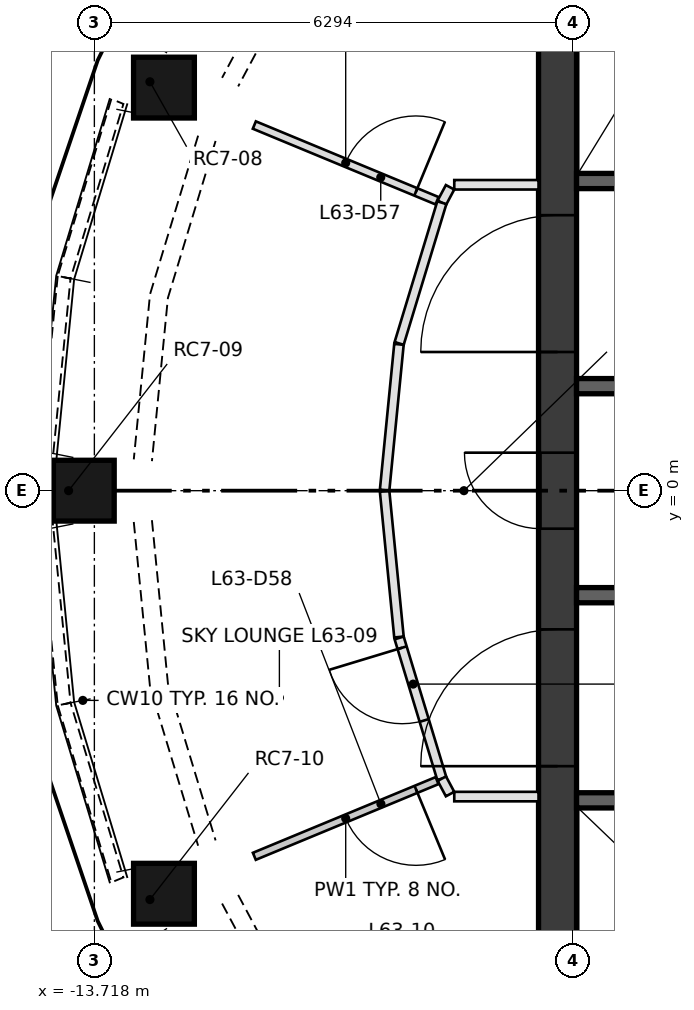
"""IFC4 building model, lengths in metres.
Left out: names, types, materials, properties, quantities, classifications, styles, units other than length and angle.
Written with IfcOpenShell. Run it as: python <this file> out.ifc"""

import sys

from ifc_helpers import new_model, si_unit, direction, frame, frame_2d, origin, origin_2d, place, context, subcontext, project, spatial, polyline, rectangle, outline, extrude, element, fill, save


model = new_model("IFC4")
c1 = context("Model", 3, precision=1e-05, world=origin(), true_north=direction((0.0, 1.0)))
c2 = subcontext(c1, "Body", "Model", "MODEL_VIEW")
j1 = project(units=[si_unit("LENGTHUNIT", "METRE"), si_unit("PLANEANGLEUNIT", "RADIAN")], contexts=[c1])
p1 = place(None, origin())
s1 = spatial("IfcSite", under=j1, at=p1, CompositionType="ELEMENT")
p2 = place(p1, origin())
s2 = spatial("IfcBuilding", under=s1, at=p2, CompositionType="ELEMENT")
p3 = place(p2, frame((0.0, 0.0, 231.2)))
s3 = spatial("IfcBuildingStorey", under=s2, at=p3, CompositionType="ELEMENT", Elevation=231.2)
p4 = place(p3, frame((-12.987, 5.379, 0.5), z_axis=(0.0, 0.0, 1.0), x_axis=(0.382642651649, 0.923896423382, 0.0)))
e1 = element("IfcColumn", 1, at=p4, inside=s3, PredefinedType="COLUMN", context=c2, shape_type="SweptSolid", body=[
    extrude(rectangle(XDim=0.8, YDim=0.8, at=origin_2d()), origin(), (0.0, -0.275, 0.962), 3.328),
])
p5 = place(p3, frame((-14.057, 0.0, 0.5), z_axis=(0.0, 0.0, 1.0), x_axis=(0.0, 1.0, 0.0)))
e2 = element("IfcColumn", 2, at=p5, inside=s3, PredefinedType="COLUMN", context=c2, shape_type="SweptSolid", body=[
    extrude(rectangle(XDim=0.8, YDim=0.8, at=origin_2d()), origin(), (0.0, -0.275, 0.962), 3.328),
])
p6 = place(p3, frame((-12.987, -5.379, 0.5), z_axis=(0.0, 0.0, 1.0), x_axis=(-0.382642651649, 0.923896423382, 0.0)))
e3 = element("IfcColumn", 3, at=p6, inside=s3, PredefinedType="COLUMN", context=c2, shape_type="SweptSolid", body=[
    extrude(rectangle(XDim=0.8, YDim=0.8, at=origin_2d()), origin(), (0.0, -0.275, 0.962), 3.328),
])
p7 = place(p3, frame((-7.624, -7.374, 0.0), z_axis=(0.0, 0.0, 1.0), x_axis=(0.0, 1.0, 0.0)))
e4 = element("IfcWall", 4, at=p7, inside=s3, PredefinedType="SHEAR", context=c2, shape_type="SweptSolid", body=[
    extrude(rectangle(XDim=14.748, YDim=0.5, at=frame_2d((7.374, 0.0))), origin(), (0.0, 0.0, 1.0), 3.3),
])
p8 = place(p7, frame((6.874, 0.0, 0.0)))
e5 = element("IfcOpeningElement", 5, at=p8, cuts=e4, PredefinedType="OPENING", context=c2, shape_type="SweptSolid", body=[
    extrude(rectangle(XDim=1.0, YDim=2.1, at=frame_2d((0.5, 1.05))), frame((0.0, 0.26, 0.0), z_axis=(0.0, -1.0, 0.0), x_axis=(1.0, 0.0, 0.0)), (0.0, 0.0, 1.0), 0.52),
])
p9 = place(p7, frame((3.75, 0.0, 0.0)))
e6 = element("IfcOpeningElement", 6, at=p9, cuts=e4, PredefinedType="OPENING", context=c2, shape_type="SweptSolid", body=[
    extrude(rectangle(XDim=1.8, YDim=2.1, at=frame_2d((0.9, 1.05))), frame((0.0, 0.26, 0.0), z_axis=(0.0, -1.0, 0.0), x_axis=(1.0, 0.0, 0.0)), (0.0, 0.0, 1.0), 0.52),
])
p10 = place(p7, frame((9.198, 0.0, 0.0)))
e7 = element("IfcOpeningElement", 7, at=p10, cuts=e4, PredefinedType="OPENING", context=c2, shape_type="SweptSolid", body=[
    extrude(rectangle(XDim=1.8, YDim=2.1, at=frame_2d((0.9, 1.05))), frame((0.0, 0.26, 0.0), z_axis=(0.0, -1.0, 0.0), x_axis=(1.0, 0.0, 0.0)), (0.0, 0.0, 1.0), 0.52),
])
p11 = place(p3, frame((-7.374, -4.074, 0.0), z_axis=(0.0, 0.0, 1.0), x_axis=(1.0, 0.0, 0.0)))
e8 = element("IfcWall", 8, at=p11, inside=s3, PredefinedType="SHEAR", context=c2, shape_type="SweptSolid", body=[
    extrude(rectangle(XDim=14.748, YDim=0.2, at=frame_2d((7.374, 0.0))), origin(), (0.0, 0.0, 1.0), 3.3),
])
p12 = place(p11, frame((1.319, 0.0, 0.0)))
e9 = element("IfcOpeningElement", 9, at=p12, cuts=e8, PredefinedType="OPENING", context=c2, shape_type="SweptSolid", body=[
    extrude(rectangle(XDim=1.1, YDim=2.1, at=frame_2d((0.55, 1.05))), frame((0.0, 0.11, 0.0), z_axis=(0.0, -1.0, 0.0), x_axis=(1.0, 0.0, 0.0)), (0.0, 0.0, 1.0), 0.22),
])
p13 = place(p11, frame((4.456, 0.0, 0.0)))
e10 = element("IfcOpeningElement", 10, at=p13, cuts=e8, PredefinedType="OPENING", context=c2, shape_type="SweptSolid", body=[
    extrude(rectangle(XDim=1.1, YDim=2.1, at=frame_2d((0.55, 1.05))), frame((0.0, 0.11, 0.0), z_axis=(0.0, -1.0, 0.0), x_axis=(1.0, 0.0, 0.0)), (0.0, 0.0, 1.0), 0.22),
])
p14 = place(p11, frame((7.689, 0.0, 0.0)))
e11 = element("IfcOpeningElement", 11, at=p14, cuts=e8, PredefinedType="OPENING", context=c2, shape_type="SweptSolid", body=[
    extrude(rectangle(XDim=1.0, YDim=2.1, at=frame_2d((0.5, 1.05))), frame((0.0, 0.11, 0.0), z_axis=(0.0, -1.0, 0.0), x_axis=(1.0, 0.0, 0.0)), (0.0, 0.0, 1.0), 0.22),
])
p15 = place(p11, frame((10.413, 0.0, 0.0)))
e12 = element("IfcOpeningElement", 12, at=p15, cuts=e8, PredefinedType="OPENING", context=c2, shape_type="SweptSolid", body=[
    extrude(rectangle(XDim=1.0, YDim=2.1, at=frame_2d((0.5, 1.05))), frame((0.0, 0.11, 0.0), z_axis=(0.0, -1.0, 0.0), x_axis=(1.0, 0.0, 0.0)), (0.0, 0.0, 1.0), 0.22),
])
p16 = place(p11, frame((12.935, 0.0, 0.0)))
e13 = element("IfcOpeningElement", 13, at=p16, cuts=e8, PredefinedType="OPENING", context=c2, shape_type="SweptSolid", body=[
    extrude(rectangle(XDim=1.0, YDim=2.1, at=frame_2d((0.5, 1.05))), frame((0.0, 0.11, 0.0), z_axis=(0.0, -1.0, 0.0), x_axis=(1.0, 0.0, 0.0)), (0.0, 0.0, 1.0), 0.22),
])
p17 = place(p3, frame((-7.374, 4.074, 0.0), z_axis=(0.0, 0.0, 1.0), x_axis=(1.0, 0.0, 0.0)))
e14 = element("IfcWall", 14, at=p17, inside=s3, PredefinedType="SHEAR", context=c2, shape_type="SweptSolid", body=[
    extrude(rectangle(XDim=7.374, YDim=0.2, at=frame_2d((3.687, 0.0))), origin(), (0.0, 0.0, 1.0), 3.3),
])
p18 = place(p17, frame((0.684, 0.0, 0.0)))
e15 = element("IfcOpeningElement", 15, at=p18, cuts=e14, PredefinedType="OPENING", context=c2, shape_type="SweptSolid", body=[
    extrude(rectangle(XDim=1.0, YDim=2.1, at=frame_2d((0.5, 1.05))), frame((0.0, 0.11, 0.0), z_axis=(0.0, -1.0, 0.0), x_axis=(1.0, 0.0, 0.0)), (0.0, 0.0, 1.0), 0.22),
])
p19 = place(p17, frame((2.453, 0.0, 0.0)))
e16 = element("IfcOpeningElement", 16, at=p19, cuts=e14, PredefinedType="OPENING", context=c2, shape_type="SweptSolid", body=[
    extrude(rectangle(XDim=1.0, YDim=2.1, at=frame_2d((0.5, 1.05))), frame((0.0, 0.11, 0.0), z_axis=(0.0, -1.0, 0.0), x_axis=(1.0, 0.0, 0.0)), (0.0, 0.0, 1.0), 0.22),
])
p20 = place(p17, frame((4.221, 0.0, 0.0)))
e17 = element("IfcOpeningElement", 17, at=p20, cuts=e14, PredefinedType="OPENING", context=c2, shape_type="SweptSolid", body=[
    extrude(rectangle(XDim=1.0, YDim=2.1, at=frame_2d((0.5, 1.05))), frame((0.0, 0.11, 0.0), z_axis=(0.0, -1.0, 0.0), x_axis=(1.0, 0.0, 0.0)), (0.0, 0.0, 1.0), 0.22),
])
p21 = place(p17, frame((5.99, 0.0, 0.0)))
e18 = element("IfcOpeningElement", 18, at=p21, cuts=e14, PredefinedType="OPENING", context=c2, shape_type="SweptSolid", body=[
    extrude(rectangle(XDim=1.0, YDim=2.1, at=frame_2d((0.5, 1.05))), frame((0.0, 0.11, 0.0), z_axis=(0.0, -1.0, 0.0), x_axis=(1.0, 0.0, 0.0)), (0.0, 0.0, 1.0), 0.22),
])
for number, where, z_axis, x_axis in (
    (19, (-7.374, -1.375, 0.0), (0.0, 0.0, 1.0), (1.0, 0.0, 0.0)),
    (20, (-7.374, 1.375, 0.0), (0.0, 0.0, 1.0), (1.0, 0.0, 0.0)),
):
    element("IfcWall", number, at=place(p3, frame(where, z_axis=z_axis, x_axis=x_axis)), inside=s3, PredefinedType="SHEAR", context=c2, shape_type="SweptSolid", body=[
        extrude(rectangle(XDim=3.0, YDim=0.2, at=frame_2d((1.5, 0.0))), origin(), (0.0, 0.0, 1.0), 3.3),
    ])
p22 = place(p3, frame((-12.038, 8.044, 0.0), z_axis=(-0.824402860411, 0.441126603603, 0.354636776631), x_axis=(-0.471787066311, -0.881712517728, 1.195964e-05)))
e21 = element("IfcWall", 21, at=p22, inside=s3, PredefinedType="SOLIDWALL", context=c2, shape_type="SweptSolid", body=[
    extrude(outline(polyline([(0.0, 0.0), (2.434, 5.551e-17), (2.417, 0.481), (0.017, 0.481), (0.0, 0.0)])), origin(), (0.0, 0.0, -1.0), 0.3),
])
p23 = place(p3, frame((-13.494, 5.154, 0.0), z_axis=(-0.894631168658, 0.271094631402, 0.355165838574), x_axis=(-0.290000037325, -0.957026634075, 4.815507e-06)))
e22 = element("IfcWall", 22, at=p23, inside=s3, PredefinedType="SOLIDWALL", context=c2, shape_type="SweptSolid", body=[
    extrude(outline(polyline([(0.0, 0.0), (2.434, 0.0), (2.417, 0.481), (0.017, 0.481), (0.0, 0.0)])), origin(), (0.0, 0.0, -1.0), 0.3),
])
p24 = place(p3, frame((-14.2, 2.824, 0.0), z_axis=(-0.93035064291, 0.091755306795, 0.355005133642), x_axis=(-0.098145054237, -0.995172119915, 8.475565e-06)))
e23 = element("IfcWall", 23, at=p24, inside=s3, PredefinedType="SOLIDWALL", context=c2, shape_type="SweptSolid", body=[
    extrude(outline(polyline([(0.0, 0.0), (2.433, 1.388e-17), (2.417, 0.481), (0.017, 0.481), (0.0, 0.0)])), origin(), (0.0, 0.0, -1.0), 0.3),
])
p25 = place(p3, frame((-14.439, -0.403, 0.0), z_axis=(-0.93035064291, -0.091755306795, 0.355005133642), x_axis=(0.098145054237, -0.995172119915, -8.475565e-06)))
e24 = element("IfcWall", 24, at=p25, inside=s3, PredefinedType="SOLIDWALL", context=c2, shape_type="SweptSolid", body=[
    extrude(outline(polyline([(0.0, 0.0), (2.433, -1.388e-17), (2.417, 0.481), (0.017, 0.481), (0.0, 0.0)])), origin(), (0.0, 0.0, -1.0), 0.3),
])
p26 = place(p3, frame((-14.2, -2.824, 0.0), z_axis=(-0.894721380135, -0.271074750296, 0.354953703573), x_axis=(0.289959608839, -0.957038883806, 1.1226683e-05)))
e25 = element("IfcWall", 25, at=p26, inside=s3, PredefinedType="SOLIDWALL", context=c2, shape_type="SweptSolid", body=[
    extrude(outline(polyline([(0.0, 0.0), (2.434, -5.551e-17), (2.417, 0.481), (0.017, 0.481), (0.0, 0.0)])), origin(), (0.0, 0.0, -1.0), 0.3),
])
p27 = place(p3, frame((-13.186, -5.898, 0.0), z_axis=(-0.824332600798, -0.441016524886, 0.35493687895), x_axis=(0.471734377661, -0.881740708382, 1.0715603e-05)))
e26 = element("IfcWall", 26, at=p27, inside=s3, PredefinedType="SOLIDWALL", context=c2, shape_type="SweptSolid", body=[
    extrude(outline(polyline([(0.0, 0.0), (2.434, 0.0), (2.417, 0.481), (0.017, 0.481), (0.0, 0.0)])), origin(), (0.0, 0.0, -1.0), 0.3),
])
p28 = place(p3, frame((-9.146, 3.789, 0.0), z_axis=(0.0, 0.0, 1.0), x_axis=(0.471249165364, 0.882000127066, 0.0)))
e27 = element("IfcWall", 27, at=p28, inside=s3, PredefinedType="PARTITIONING", context=c2, shape_type="SweptSolid", body=[
    extrude(rectangle(XDim=0.23, YDim=0.125, at=frame_2d((0.115, 0.0))), origin(), (0.0, 0.0, 1.0), 3.3),
])
p29 = place(p3, frame((-8.983, 4.024, 0.0), z_axis=(0.0, 0.0, 1.0), x_axis=(1.0, 0.0, 0.0)))
e28 = element("IfcWall", 28, at=p29, inside=s3, PredefinedType="PARTITIONING", context=c2, shape_type="SweptSolid", body=[
    extrude(rectangle(XDim=1.109, YDim=0.125, at=frame_2d((0.554, 0.0))), origin(), (0.0, 0.0, 1.0), 3.3),
])
for number, where, z_axis, x_axis in (
    (29, (-9.899, 0.006, 0.0), (0.0, 0.0, 1.0), (0.098, 0.995, 0.0)),
    (30, (-9.71, -1.925, 0.0), (0.0, 0.0, 1.0), (-0.098, 0.995, 0.0)),
):
    element("IfcWall", number, at=place(p3, frame(where, z_axis=z_axis, x_axis=x_axis)), inside=s3, PredefinedType="PARTITIONING", context=c2, shape_type="SweptSolid", body=[
        extrude(rectangle(XDim=1.928, YDim=0.125, at=frame_2d((0.964, 0.0))), origin(), (0.0, 0.0, 1.0), 3.3),
    ])
p30 = place(p3, frame((-9.708, 1.937, 0.0), z_axis=(0.0, 0.0, 1.0), x_axis=(0.29025256199, 0.956950077203, 0.0)))
e31 = element("IfcWall", 31, at=p30, inside=s3, PredefinedType="PARTITIONING", context=c2, shape_type="SweptSolid", body=[
    extrude(rectangle(XDim=1.935, YDim=0.125, at=frame_2d((0.967, 0.0))), origin(), (0.0, 0.0, 1.0), 3.3),
])
p31 = place(p3, frame((-9.146, -3.789, 0.0), z_axis=(0.0, 0.0, 1.0), x_axis=(-0.29025256199, 0.956950077203, 0.0)))
e32 = element("IfcWall", 32, at=p31, inside=s3, PredefinedType="PARTITIONING", context=c2, shape_type="SweptSolid", body=[
    extrude(rectangle(XDim=1.935, YDim=0.125, at=frame_2d((0.967, 0.0))), origin(), (0.0, 0.0, 1.0), 3.3),
])
p32 = place(p31, frame((0.8, 0.0, 0.0)))
e33 = element("IfcOpeningElement", 33, at=p32, cuts=e32, PredefinedType="OPENING", context=c2, shape_type="SweptSolid", body=[
    extrude(rectangle(XDim=1.0, YDim=2.1, at=frame_2d((0.5, 1.05))), frame((0.0, 0.073, 0.0), z_axis=(0.0, -1.0, 0.0), x_axis=(1.0, 0.0, 0.0)), (0.0, 0.0, 1.0), 0.145),
])
p33 = place(p3, frame((-9.038, -3.991, 0.0), z_axis=(0.0, 0.0, 1.0), x_axis=(-0.471249165364, 0.882000127066, 0.0)))
e34 = element("IfcWall", 34, at=p33, inside=s3, PredefinedType="PARTITIONING", context=c2, shape_type="SweptSolid", body=[
    extrude(rectangle(XDim=0.23, YDim=0.125, at=frame_2d((0.115, 0.0))), origin(), (0.0, 0.0, 1.0), 3.3),
])
p34 = place(p3, frame((-7.874, -4.024, 0.0), z_axis=(0.0, 0.0, 1.0), x_axis=(-1.0, 0.0, 0.0)))
e35 = element("IfcWall", 35, at=p34, inside=s3, PredefinedType="PARTITIONING", context=c2, shape_type="SweptSolid", body=[
    extrude(rectangle(XDim=1.109, YDim=0.125, at=frame_2d((0.554, 0.0))), origin(), (0.0, 0.0, 1.0), 3.3),
])
p35 = place(p3, frame((-11.613, 4.81, 0.0), z_axis=(0.0, 0.0, 1.0), x_axis=(0.923904773076, -0.382622490566, 0.0)))
e36 = element("IfcWall", 36, at=p35, inside=s3, PredefinedType="PARTITIONING", context=c2, shape_type="SweptSolid", body=[
    extrude(rectangle(XDim=2.602, YDim=0.105, at=frame_2d((1.301, 0.0))), origin(), (0.0, 0.0, 1.0), 3.3),
])
p36 = place(p35, frame((1.3, 0.0, 0.0)))
e37 = element("IfcOpeningElement", 37, at=p36, cuts=e36, PredefinedType="OPENING", context=c2, shape_type="SweptSolid", body=[
    extrude(rectangle(XDim=1.0, YDim=2.1, at=frame_2d((0.5, 1.05))), frame((0.0, 0.062, 0.0), z_axis=(0.0, -1.0, 0.0), x_axis=(1.0, 0.0, 0.0)), (0.0, 0.0, 1.0), 0.125),
])
p37 = place(p3, frame((-9.209, -3.814, 0.0), z_axis=(0.0, 0.0, 1.0), x_axis=(-0.923885342263, -0.382669406082, 0.0)))
e38 = element("IfcWall", 38, at=p37, inside=s3, PredefinedType="PARTITIONING", context=c2, shape_type="SweptSolid", body=[
    extrude(rectangle(XDim=2.602, YDim=0.1, at=frame_2d((1.301, 0.0))), origin(), (0.0, 0.0, 1.0), 3.3),
])
p38 = place(p37, frame((0.3, 0.0, 0.0)))
e39 = element("IfcOpeningElement", 39, at=p38, cuts=e38, PredefinedType="OPENING", context=c2, shape_type="SweptSolid", body=[
    extrude(rectangle(XDim=1.0, YDim=2.1, at=frame_2d((0.5, 1.05))), frame((0.0, 0.06, 0.0), z_axis=(0.0, -1.0, 0.0), x_axis=(1.0, 0.0, 0.0)), (0.0, 0.0, 1.0), 0.12),
])
p39 = place(p8, origin())
e40 = element("IfcDoor", 40, at=p39, inside=s3, OperationType="SINGLE_SWING_RIGHT", PredefinedType="DOOR", context=c2, shape_type="SweptSolid", body=[
    extrude(rectangle(XDim=1.0, YDim=2.1, at=frame_2d((0.5, 1.05))), frame((0.0, 0.25, 0.0), z_axis=(0.0, -1.0, 0.0), x_axis=(1.0, 0.0, 0.0)), (0.0, 0.0, 1.0), 0.05),
])
fill(e5, e40)
p40 = place(p9, origin())
e41 = element("IfcDoor", 41, at=p40, inside=s3, OperationType="DOUBLE_DOOR_SINGLE_SWING", PredefinedType="DOOR", context=c2, shape_type="SweptSolid", body=[
    extrude(rectangle(XDim=1.8, YDim=2.1, at=frame_2d((0.9, 1.05))), frame((0.0, 0.025, 0.0), z_axis=(0.0, -1.0, 0.0), x_axis=(1.0, 0.0, 0.0)), (0.0, 0.0, 1.0), 0.05),
])
fill(e6, e41)
p41 = place(p10, origin())
e42 = element("IfcDoor", 42, at=p41, inside=s3, OperationType="DOUBLE_DOOR_SINGLE_SWING", PredefinedType="DOOR", context=c2, shape_type="SweptSolid", body=[
    extrude(rectangle(XDim=1.8, YDim=2.1, at=frame_2d((0.9, 1.05))), frame((0.0, 0.025, 0.0), z_axis=(0.0, -1.0, 0.0), x_axis=(1.0, 0.0, 0.0)), (0.0, 0.0, 1.0), 0.05),
])
fill(e7, e42)
p42 = place(p32, origin())
e43 = element("IfcDoor", 43, at=p42, inside=s3, OperationType="SINGLE_SWING_RIGHT", PredefinedType="DOOR", context=c2, shape_type="SweptSolid", body=[
    extrude(rectangle(XDim=1.0, YDim=2.1, at=frame_2d((0.5, 1.05))), frame((0.0, 0.025, 0.0), z_axis=(0.0, -1.0, 0.0), x_axis=(1.0, 0.0, 0.0)), (0.0, 0.0, 1.0), 0.05),
])
fill(e33, e43)
p43 = place(p36, origin())
e44 = element("IfcDoor", 44, at=p43, inside=s3, OperationType="SINGLE_SWING_RIGHT", PredefinedType="DOOR", context=c2, shape_type="SweptSolid", body=[
    extrude(rectangle(XDim=1.0, YDim=2.1, at=frame_2d((0.5, 1.05))), frame((0.0, 0.025, 0.0), z_axis=(0.0, -1.0, 0.0), x_axis=(1.0, 0.0, 0.0)), (0.0, 0.0, 1.0), 0.05),
])
fill(e37, e44)
p44 = place(p38, origin())
e45 = element("IfcDoor", 45, at=p44, inside=s3, OperationType="SINGLE_SWING_LEFT", PredefinedType="DOOR", context=c2, shape_type="SweptSolid", body=[
    extrude(rectangle(XDim=1.0, YDim=2.1, at=frame_2d((0.5, 1.05))), frame((0.0, 0.025, 0.0), z_axis=(0.0, -1.0, 0.0), x_axis=(1.0, 0.0, 0.0)), (0.0, 0.0, 1.0), 0.05),
])
fill(e39, e45)
save(model, sys.argv[1])
